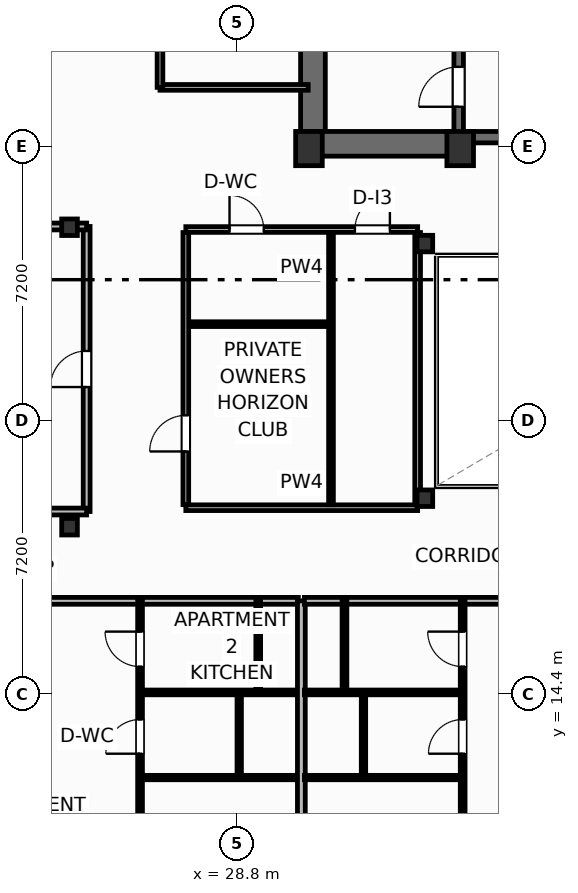
"""IFC4 building model, lengths in metres.
Left out: names, types, materials, properties, quantities, classifications, styles, units other than length and angle.
Written with IfcOpenShell. Run it as: python <this file> out.ifc"""

import sys

from ifc_helpers import new_model, si_unit, direction, frame, frame_2d, origin, origin_2d, place, context, subcontext, project, spatial, rectangle, i_section, extrude, element, fill, save


model = new_model("IFC4")
c1 = context("Model", 3, precision=1e-05, world=origin(), true_north=direction((0.0, 1.0)))
c2 = subcontext(c1, "Body", "Model", "MODEL_VIEW")
j1 = project(units=[si_unit("LENGTHUNIT", "METRE"), si_unit("PLANEANGLEUNIT", "RADIAN")], contexts=[c1])
p1 = place(None, origin())
s1 = spatial("IfcSite", under=j1, at=p1, CompositionType="ELEMENT")
p2 = place(p1, origin())
s2 = spatial("IfcBuilding", under=s1, at=p2, CompositionType="ELEMENT")
p3 = place(p2, frame((0.0, 0.0, 216.4)))
s3 = spatial("IfcBuildingStorey", under=s2, at=p3, CompositionType="ELEMENT", Elevation=216.4)
for number, where, z_axis, x_axis in (
    (1, (30.7, 28.75, 0.0), (0.0, 0.0, 1.0), (1.0, 0.0, 0.0)),
    (2, (34.68, 28.75, 0.0), (0.0, 0.0, 1.0), (1.0, 0.0, 0.0)),
):
    element("IfcColumn", number, at=place(p3, frame(where, z_axis=z_axis, x_axis=x_axis)), inside=s3, PredefinedType="COLUMN", context=c2, shape_type="SweptSolid", body=[
        extrude(rectangle(XDim=0.7, YDim=0.9, at=origin_2d()), origin(), (0.0, 0.0, 1.0), 3.7),
    ])
for number, where, z_axis, x_axis in (
    (3, (33.75, 19.55, 0.0), (0.0, 0.0, 1.0), (1.0, 0.0, 0.0)),
    (4, (33.75, 26.25, 0.0), (0.0, 0.0, 1.0), (1.0, 0.0, 0.0)),
    (5, (24.4, 18.8, 0.0), (0.0, 0.0, 1.0), (1.0, 0.0, 0.0)),
    (6, (24.4, 26.68, 0.0), (0.0, 0.0, 1.0), (1.0, 0.0, 0.0)),
):
    element("IfcColumn", number, at=place(p3, frame(where, z_axis=z_axis, x_axis=x_axis)), inside=s3, PredefinedType="COLUMN", context=c2, shape_type="SweptSolid", body=[
        extrude(i_section(OverallWidth=0.412, OverallDepth=0.435, WebThickness=0.036, FlangeThickness=0.057, FilletRadius=0.025, at=origin_2d()), origin(), (0.0, 0.0, 1.0), 3.7),
    ])
p4 = place(p3, frame((30.805, 29.2, 0.0), z_axis=(0.0, 0.0, 1.0), x_axis=(0.0, 1.0, 0.0)))
e7 = element("IfcWall", 7, at=p4, inside=s3, PredefinedType="SHEAR", context=c2, shape_type="SweptSolid", body=[
    extrude(rectangle(XDim=9.22, YDim=0.65, at=frame_2d((4.61, 0.0))), origin(), (0.0, 0.0, 1.0), 3.45),
])
p5 = place(p3, frame((30.48, 28.875, 0.0), z_axis=(0.0, 0.0, 1.0), x_axis=(1.0, 0.0, 0.0)))
e8 = element("IfcWall", 8, at=p5, inside=s3, PredefinedType="SHEAR", context=c2, shape_type="SweptSolid", body=[
    extrude(rectangle(XDim=4.32, YDim=0.65, at=frame_2d((2.16, 0.0))), origin(), (0.0, 0.0, 1.0), 3.45),
])
p6 = place(p3, frame((34.8, 29.05, 0.0), z_axis=(0.0, 0.0, 1.0), x_axis=(1.0, 0.0, 0.0)))
e9 = element("IfcWall", 9, at=p6, inside=s3, PredefinedType="SHEAR", context=c2, shape_type="SweptSolid", body=[
    extrude(rectangle(XDim=8.8, YDim=0.3, at=frame_2d((4.4, 0.0))), origin(), (0.0, 0.0, 1.0), 3.45),
])
p7 = place(p6, frame((0.95, 0.0, 0.0)))
e10 = element("IfcOpeningElement", 10, at=p7, cuts=e9, PredefinedType="OPENING", context=c2, shape_type="SweptSolid", body=[
    extrude(rectangle(XDim=1.1, YDim=2.15, at=frame_2d((0.55, 1.075))), frame((0.0, 0.16, 0.0), z_axis=(0.0, -1.0, 0.0), x_axis=(1.0, 0.0, 0.0)), (0.0, 0.0, 1.0), 0.32),
])
p8 = place(p6, frame((6.75, 0.0, 0.0)))
e11 = element("IfcOpeningElement", 11, at=p8, cuts=e9, PredefinedType="OPENING", context=c2, shape_type="SweptSolid", body=[
    extrude(rectangle(XDim=1.1, YDim=2.15, at=frame_2d((0.55, 1.075))), frame((0.0, 0.16, 0.0), z_axis=(0.0, -1.0, 0.0), x_axis=(1.0, 0.0, 0.0)), (0.0, 0.0, 1.0), 0.32),
])
p9 = place(p6, frame((3.32, 0.0, 0.0)))
e12 = element("IfcOpeningElement", 12, at=p9, cuts=e9, PredefinedType="OPENING", context=c2, shape_type="SweptSolid", body=[
    extrude(rectangle(XDim=0.95, YDim=2.15, at=frame_2d((0.475, 1.075))), frame((0.0, 0.16, 0.0), z_axis=(0.0, -1.0, 0.0), x_axis=(1.0, 0.0, 0.0)), (0.0, 0.0, 1.0), 0.32),
])
p10 = place(p3, frame((34.64, 29.2, 0.0), z_axis=(0.0, 0.0, 1.0), x_axis=(0.0, 1.0, 0.0)))
e13 = element("IfcWall", 13, at=p10, inside=s3, PredefinedType="SHEAR", context=c2, shape_type="SweptSolid", body=[
    extrude(rectangle(XDim=9.22, YDim=0.25, at=frame_2d((4.61, 0.0))), origin(), (0.0, 0.0, 1.0), 3.45),
])
p11 = place(p10, frame((0.65, 0.0, 0.0)))
e14 = element("IfcOpeningElement", 14, at=p11, cuts=e13, PredefinedType="OPENING", context=c2, shape_type="SweptSolid", body=[
    extrude(rectangle(XDim=1.05, YDim=2.15, at=frame_2d((0.525, 1.075))), frame((0.0, 0.135, 0.0), z_axis=(0.0, -1.0, 0.0), x_axis=(1.0, 0.0, 0.0)), (0.0, 0.0, 1.0), 0.27),
])
p12 = place(p3, frame((20.58, 16.85, 0.0), z_axis=(0.0, 0.0, 1.0), x_axis=(1.0, 0.0, 0.0)))
e15 = element("IfcWall", 15, at=p12, inside=s3, PredefinedType="PARTITIONING", context=c2, shape_type="SweptSolid", body=[
    extrude(rectangle(XDim=9.84, YDim=0.18, at=frame_2d((4.92, 0.0))), origin(), (0.0, 0.0, 1.0), 3.45),
])
p13 = place(p12, frame((2.302, 0.0, 0.0)))
e16 = element("IfcOpeningElement", 16, at=p13, cuts=e15, PredefinedType="OPENING", context=c2, shape_type="SweptSolid", body=[
    extrude(rectangle(XDim=1.0, YDim=2.2, at=frame_2d((0.5, 1.1))), frame((0.0, 0.1, 0.0), z_axis=(0.0, -1.0, 0.0), x_axis=(1.0, 0.0, 0.0)), (0.0, 0.0, 1.0), 0.2),
])
p14 = place(p3, frame((26.255, -1.478, 0.0), z_axis=(0.0, 0.0, 1.0), x_axis=(0.0, 1.0, 0.0)))
e17 = element("IfcWall", 17, at=p14, inside=s3, PredefinedType="PARTITIONING", context=c2, shape_type="SweptSolid", body=[
    extrude(rectangle(XDim=18.328, YDim=0.125, at=frame_2d((9.164, 0.0))), origin(), (0.0, 0.0, 1.0), 2.739),
])
p15 = place(p14, frame((6.319, 0.0, 0.0)))
e18 = element("IfcOpeningElement", 18, at=p15, cuts=e17, PredefinedType="OPENING", context=c2, shape_type="SweptSolid", body=[
    extrude(rectangle(XDim=0.92, YDim=2.05, at=frame_2d((0.46, 1.025))), frame((0.0, 0.073, 0.0), z_axis=(0.0, -1.0, 0.0), x_axis=(1.0, 0.0, 0.0)), (0.0, 0.0, 1.0), 0.145),
])
p16 = place(p14, frame((14.305, 0.0, 0.0)))
e19 = element("IfcOpeningElement", 19, at=p16, cuts=e17, PredefinedType="OPENING", context=c2, shape_type="SweptSolid", body=[
    extrude(rectangle(XDim=0.9, YDim=2.05, at=frame_2d((0.45, 1.025))), frame((0.0, 0.073, 0.0), z_axis=(0.0, -1.0, 0.0), x_axis=(1.0, 0.0, 0.0)), (0.0, 0.0, 1.0), 0.145),
])
p17 = place(p14, frame((16.598, 0.0, 0.0)))
e20 = element("IfcOpeningElement", 20, at=p17, cuts=e17, PredefinedType="OPENING", context=c2, shape_type="SweptSolid", body=[
    extrude(rectangle(XDim=0.92, YDim=2.05, at=frame_2d((0.46, 1.025))), frame((0.0, 0.073, 0.0), z_axis=(0.0, -1.0, 0.0), x_axis=(1.0, 0.0, 0.0)), (0.0, 0.0, 1.0), 0.145),
])
p18 = place(p3, frame((26.325, 14.44, 0.0), z_axis=(0.0, 0.0, 1.0), x_axis=(1.0, 0.0, 0.0)))
e21 = element("IfcWall", 21, at=p18, inside=s3, PredefinedType="PARTITIONING", context=c2, shape_type="SweptSolid", body=[
    extrude(rectangle(XDim=4.095, YDim=0.125, at=frame_2d((2.047, 0.0))), origin(), (0.0, 0.0, 1.0), 3.45),
])
p19 = place(p3, frame((26.325, 12.2, 0.0), z_axis=(0.0, 0.0, 1.0), x_axis=(1.0, 0.0, 0.0)))
e22 = element("IfcWall", 22, at=p19, inside=s3, PredefinedType="PARTITIONING", context=c2, shape_type="SweptSolid", body=[
    extrude(rectangle(XDim=4.095, YDim=0.115, at=frame_2d((2.047, 0.0))), origin(), (0.0, 0.0, 1.0), 3.45),
])
p20 = place(p3, frame((29.365, 14.44, 0.0), z_axis=(0.0, 0.0, 1.0), x_axis=(0.0, 1.0, 0.0)))
e23 = element("IfcWall", 23, at=p20, inside=s3, PredefinedType="PARTITIONING", context=c2, shape_type="SweptSolid", body=[
    extrude(rectangle(XDim=2.41, YDim=0.125, at=frame_2d((1.205, 0.0))), origin(), (0.0, 0.0, 1.0), 3.45),
])
p21 = place(p3, frame((28.865, 12.2, 0.0), z_axis=(0.0, 0.0, 1.0), x_axis=(0.0, 1.0, 0.0)))
e24 = element("IfcWall", 24, at=p21, inside=s3, PredefinedType="PARTITIONING", context=c2, shape_type="SweptSolid", body=[
    extrude(rectangle(XDim=2.24, YDim=0.115, at=frame_2d((1.12, 0.0))), origin(), (0.0, 0.0, 1.0), 3.45),
])
p22 = place(p3, frame((30.5, 0.129, 0.0), z_axis=(0.0, 0.0, 1.0), x_axis=(0.0, 1.0, 0.0)))
e25 = element("IfcWall", 25, at=p22, inside=s3, PredefinedType="PARTITIONING", context=c2, shape_type="SweptSolid", body=[
    extrude(rectangle(XDim=16.721, YDim=0.205, at=frame_2d((8.36, 0.0))), origin(), (0.0, 0.0, 1.0), 3.45),
])
p23 = place(p3, frame((30.58, 16.85, 0.0), z_axis=(0.0, 0.0, 1.0), x_axis=(1.0, 0.0, 0.0)))
e26 = element("IfcWall", 26, at=p23, inside=s3, PredefinedType="PARTITIONING", context=c2, shape_type="SweptSolid", body=[
    extrude(rectangle(XDim=9.84, YDim=0.18, at=frame_2d((4.92, 0.0))), origin(), (0.0, 0.0, 1.0), 3.45),
])
p24 = place(p23, frame((6.537, 0.0, 0.0)))
e27 = element("IfcOpeningElement", 27, at=p24, cuts=e26, PredefinedType="OPENING", context=c2, shape_type="SweptSolid", body=[
    extrude(rectangle(XDim=1.0, YDim=2.2, at=frame_2d((0.5, 1.1))), frame((0.0, 0.1, 0.0), z_axis=(0.0, -1.0, 0.0), x_axis=(1.0, 0.0, 0.0)), (0.0, 0.0, 1.0), 0.2),
])
p25 = place(p3, frame((34.745, 1.736, 0.0), z_axis=(0.0, 0.0, 1.0), x_axis=(0.0, 1.0, 0.0)))
e28 = element("IfcWall", 28, at=p25, inside=s3, PredefinedType="PARTITIONING", context=c2, shape_type="SweptSolid", body=[
    extrude(rectangle(XDim=15.114, YDim=0.125, at=frame_2d((7.557, 0.0))), origin(), (0.0, 0.0, 1.0), 2.739),
])
p26 = place(p25, frame((4.712, 0.0, 0.0)))
e29 = element("IfcOpeningElement", 29, at=p26, cuts=e28, PredefinedType="OPENING", context=c2, shape_type="SweptSolid", body=[
    extrude(rectangle(XDim=0.92, YDim=2.05, at=frame_2d((0.46, 1.025))), frame((0.0, 0.073, 0.0), z_axis=(0.0, -1.0, 0.0), x_axis=(1.0, 0.0, 0.0)), (0.0, 0.0, 1.0), 0.145),
])
p27 = place(p25, frame((11.091, 0.0, 0.0)))
e30 = element("IfcOpeningElement", 30, at=p27, cuts=e28, PredefinedType="OPENING", context=c2, shape_type="SweptSolid", body=[
    extrude(rectangle(XDim=0.9, YDim=2.05, at=frame_2d((0.45, 1.025))), frame((0.0, 0.073, 0.0), z_axis=(0.0, -1.0, 0.0), x_axis=(1.0, 0.0, 0.0)), (0.0, 0.0, 1.0), 0.145),
])
p28 = place(p25, frame((13.384, 0.0, 0.0)))
e31 = element("IfcOpeningElement", 31, at=p28, cuts=e28, PredefinedType="OPENING", context=c2, shape_type="SweptSolid", body=[
    extrude(rectangle(XDim=0.92, YDim=2.05, at=frame_2d((0.46, 1.025))), frame((0.0, 0.073, 0.0), z_axis=(0.0, -1.0, 0.0), x_axis=(1.0, 0.0, 0.0)), (0.0, 0.0, 1.0), 0.145),
])
p29 = place(p3, frame((30.58, 14.44, 0.0), z_axis=(0.0, 0.0, 1.0), x_axis=(1.0, 0.0, 0.0)))
e32 = element("IfcWall", 32, at=p29, inside=s3, PredefinedType="PARTITIONING", context=c2, shape_type="SweptSolid", body=[
    extrude(rectangle(XDim=4.095, YDim=0.125, at=frame_2d((2.047, 0.0))), origin(), (0.0, 0.0, 1.0), 3.45),
])
p30 = place(p3, frame((30.58, 12.2, 0.0), z_axis=(0.0, 0.0, 1.0), x_axis=(1.0, 0.0, 0.0)))
e33 = element("IfcWall", 33, at=p30, inside=s3, PredefinedType="PARTITIONING", context=c2, shape_type="SweptSolid", body=[
    extrude(rectangle(XDim=4.095, YDim=0.115, at=frame_2d((2.047, 0.0))), origin(), (0.0, 0.0, 1.0), 3.45),
])
p31 = place(p3, frame((31.635, 14.44, 0.0), z_axis=(0.0, 0.0, 1.0), x_axis=(0.0, 1.0, 0.0)))
e34 = element("IfcWall", 34, at=p31, inside=s3, PredefinedType="PARTITIONING", context=c2, shape_type="SweptSolid", body=[
    extrude(rectangle(XDim=2.41, YDim=0.125, at=frame_2d((1.205, 0.0))), origin(), (0.0, 0.0, 1.0), 3.45),
])
p32 = place(p3, frame((32.135, 12.2, 0.0), z_axis=(0.0, 0.0, 1.0), x_axis=(0.0, 1.0, 0.0)))
e35 = element("IfcWall", 35, at=p32, inside=s3, PredefinedType="PARTITIONING", context=c2, shape_type="SweptSolid", body=[
    extrude(rectangle(XDim=2.24, YDim=0.115, at=frame_2d((1.12, 0.0))), origin(), (0.0, 0.0, 1.0), 3.45),
])
p33 = place(p3, frame((24.85, 19.2, 0.0), z_axis=(0.0, 0.0, 1.0), x_axis=(0.0, 1.0, 0.0)))
e36 = element("IfcWall", 36, at=p33, inside=s3, PredefinedType="PARTITIONING", context=c2, shape_type="SweptSolid", body=[
    extrude(rectangle(XDim=7.5, YDim=0.18, at=frame_2d((3.75, 0.0))), origin(), (0.0, 0.0, 1.0), 3.45),
])
p34 = place(p33, frame((3.275, 0.0, 0.0)))
e37 = element("IfcOpeningElement", 37, at=p34, cuts=e36, PredefinedType="OPENING", context=c2, shape_type="SweptSolid", body=[
    extrude(rectangle(XDim=0.95, YDim=2.05, at=frame_2d((0.475, 1.025))), frame((0.0, 0.1, 0.0), z_axis=(0.0, -1.0, 0.0), x_axis=(1.0, 0.0, 0.0)), (0.0, 0.0, 1.0), 0.2),
])
p35 = place(p3, frame((6.306, 19.2, 0.0), z_axis=(0.0, 0.0, 1.0), x_axis=(1.0, 0.0, 0.0)))
e38 = element("IfcWall", 38, at=p35, inside=s3, PredefinedType="PARTITIONING", context=c2, shape_type="SweptSolid", body=[
    extrude(rectangle(XDim=18.544, YDim=0.18, at=frame_2d((9.272, 0.0))), origin(), (0.0, 0.0, 1.0), 3.45),
])
p36 = place(p3, frame((3.467, 26.7, 0.0), z_axis=(0.0, 0.0, 1.0), x_axis=(1.0, 0.0, 0.0)))
e39 = element("IfcWall", 39, at=p36, inside=s3, PredefinedType="PARTITIONING", context=c2, shape_type="SweptSolid", body=[
    extrude(rectangle(XDim=21.383, YDim=0.18, at=frame_2d((10.691, 0.0))), origin(), (0.0, 0.0, 1.0), 2.662),
])
p37 = place(p3, frame((27.46, 19.3, 0.0), z_axis=(0.0, 0.0, 1.0), x_axis=(1.0, 0.0, 0.0)))
e40 = element("IfcWall", 40, at=p37, inside=s3, PredefinedType="PARTITIONING", context=c2, shape_type="SweptSolid", body=[
    extrude(rectangle(XDim=6.1, YDim=0.15, at=frame_2d((3.05, 0.0))), origin(), (0.0, 0.0, 1.0), 2.662),
])
p38 = place(p3, frame((27.46, 26.62, 0.0), z_axis=(0.0, 0.0, 1.0), x_axis=(1.0, 0.0, 0.0)))
e41 = element("IfcWall", 41, at=p38, inside=s3, PredefinedType="PARTITIONING", context=c2, shape_type="SweptSolid", body=[
    extrude(rectangle(XDim=6.1, YDim=0.15, at=frame_2d((3.05, 0.0))), origin(), (0.0, 0.0, 1.0), 2.662),
])
p39 = place(p38, frame((1.15, 0.0, 0.0)))
e42 = element("IfcOpeningElement", 42, at=p39, cuts=e41, PredefinedType="OPENING", context=c2, shape_type="SweptSolid", body=[
    extrude(rectangle(XDim=0.9, YDim=2.05, at=frame_2d((0.45, 1.025))), frame((0.0, 0.085, 0.0), z_axis=(0.0, -1.0, 0.0), x_axis=(1.0, 0.0, 0.0)), (0.0, 0.0, 1.0), 0.17),
])
p40 = place(p38, frame((4.45, 0.0, 0.0)))
e43 = element("IfcOpeningElement", 43, at=p40, cuts=e41, PredefinedType="OPENING", context=c2, shape_type="SweptSolid", body=[
    extrude(rectangle(XDim=0.92, YDim=2.05, at=frame_2d((0.46, 1.025))), frame((0.0, 0.085, 0.0), z_axis=(0.0, -1.0, 0.0), x_axis=(1.0, 0.0, 0.0)), (0.0, 0.0, 1.0), 0.17),
])
p41 = place(p3, frame((31.28, 19.38, 0.0), z_axis=(0.0, 0.0, 1.0), x_axis=(0.0, 1.0, 0.0)))
e44 = element("IfcWall", 44, at=p41, inside=s3, PredefinedType="PARTITIONING", context=c2, shape_type="SweptSolid", body=[
    extrude(rectangle(XDim=7.16, YDim=0.125, at=frame_2d((3.58, 0.0))), origin(), (0.0, 0.0, 1.0), 3.45),
])
p42 = place(p3, frame((27.52, 24.13, 0.0), z_axis=(0.0, 0.0, 1.0), x_axis=(1.0, 0.0, 0.0)))
e45 = element("IfcWall", 45, at=p42, inside=s3, PredefinedType="PARTITIONING", context=c2, shape_type="SweptSolid", body=[
    extrude(rectangle(XDim=3.7, YDim=0.125, at=frame_2d((1.85, 0.0))), origin(), (0.0, 0.0, 1.0), 3.45),
])
p43 = place(p3, frame((27.46, 19.38, 0.0), z_axis=(0.0, 0.0, 1.0), x_axis=(0.0, 1.0, 0.0)))
e46 = element("IfcWall", 46, at=p43, inside=s3, PredefinedType="PARTITIONING", context=c2, shape_type="SweptSolid", body=[
    extrude(rectangle(XDim=7.16, YDim=0.15, at=frame_2d((3.58, 0.0))), origin(), (0.0, 0.0, 1.0), 3.45),
])
p44 = place(p43, frame((1.4, 0.0, 0.0)))
e47 = element("IfcOpeningElement", 47, at=p44, cuts=e46, PredefinedType="OPENING", context=c2, shape_type="SweptSolid", body=[
    extrude(rectangle(XDim=0.95, YDim=2.05, at=frame_2d((0.475, 1.025))), frame((0.0, 0.085, 0.0), z_axis=(0.0, -1.0, 0.0), x_axis=(1.0, 0.0, 0.0)), (0.0, 0.0, 1.0), 0.17),
])
p45 = place(p3, frame((33.56, 19.38, 0.0), z_axis=(0.0, 0.0, 1.0), x_axis=(0.0, 1.0, 0.0)))
e48 = element("IfcWall", 48, at=p45, inside=s3, PredefinedType="PARTITIONING", context=c2, shape_type="SweptSolid", body=[
    extrude(rectangle(XDim=7.16, YDim=0.15, at=frame_2d((3.58, 0.0))), origin(), (0.0, 0.0, 1.0), 2.824),
])
p46 = place(p3, frame((26.78, 30.36, 0.0), z_axis=(0.0, 0.0, 1.0), x_axis=(1.0, 0.0, 0.0)))
e49 = element("IfcWall", 49, at=p46, inside=s3, PredefinedType="PARTITIONING", context=c2, shape_type="SweptSolid", body=[
    extrude(rectangle(XDim=3.9, YDim=0.15, at=frame_2d((1.95, 0.0))), origin(), (0.0, 0.0, 1.0), 3.45),
])
p47 = place(p3, frame((26.78, 30.36, 0.0), z_axis=(0.0, 0.0, 1.0), x_axis=(0.0, 1.0, 0.0)))
e50 = element("IfcWall", 50, at=p47, inside=s3, PredefinedType="PARTITIONING", context=c2, shape_type="SweptSolid", body=[
    extrude(rectangle(XDim=7.9, YDim=0.15, at=frame_2d((3.95, 0.0))), origin(), (0.0, 0.0, 1.0), 3.45),
])
p48 = place(p47, frame((2.2, 0.0, 0.0)))
e51 = element("IfcOpeningElement", 51, at=p48, cuts=e50, PredefinedType="OPENING", context=c2, shape_type="SweptSolid", body=[
    extrude(rectangle(XDim=0.95, YDim=2.05, at=frame_2d((0.475, 1.025))), frame((0.0, 0.085, 0.0), z_axis=(0.0, -1.0, 0.0), x_axis=(1.0, 0.0, 0.0)), (0.0, 0.0, 1.0), 0.17),
])
p49 = place(p16, origin())
e52 = element("IfcDoor", 52, at=p49, inside=s3, OperationType="SINGLE_SWING_LEFT", PredefinedType="DOOR", context=c2, shape_type="SweptSolid", body=[
    extrude(rectangle(XDim=0.9, YDim=2.05, at=frame_2d((0.45, 1.025))), frame((0.0, 0.025, 0.0), z_axis=(0.0, -1.0, 0.0), x_axis=(1.0, 0.0, 0.0)), (0.0, 0.0, 1.0), 0.05),
])
fill(e19, e52)
p50 = place(p17, origin())
e53 = element("IfcDoor", 53, at=p50, inside=s3, OperationType="SINGLE_SWING_RIGHT", PredefinedType="DOOR", context=c2, shape_type="SweptSolid", body=[
    extrude(rectangle(XDim=0.92, YDim=2.05, at=frame_2d((0.46, 1.025))), frame((0.0, 0.025, 0.0), z_axis=(0.0, -1.0, 0.0), x_axis=(1.0, 0.0, 0.0)), (0.0, 0.0, 1.0), 0.05),
])
fill(e20, e53)
p51 = place(p27, origin())
e54 = element("IfcDoor", 54, at=p51, inside=s3, OperationType="SINGLE_SWING_LEFT", PredefinedType="DOOR", context=c2, shape_type="SweptSolid", body=[
    extrude(rectangle(XDim=0.9, YDim=2.05, at=frame_2d((0.45, 1.025))), frame((0.0, 0.025, 0.0), z_axis=(0.0, -1.0, 0.0), x_axis=(1.0, 0.0, 0.0)), (0.0, 0.0, 1.0), 0.05),
])
fill(e30, e54)
p52 = place(p28, origin())
e55 = element("IfcDoor", 55, at=p52, inside=s3, OperationType="SINGLE_SWING_RIGHT", PredefinedType="DOOR", context=c2, shape_type="SweptSolid", body=[
    extrude(rectangle(XDim=0.92, YDim=2.05, at=frame_2d((0.46, 1.025))), frame((0.0, 0.025, 0.0), z_axis=(0.0, -1.0, 0.0), x_axis=(1.0, 0.0, 0.0)), (0.0, 0.0, 1.0), 0.05),
])
fill(e31, e55)
p53 = place(p34, origin())
e56 = element("IfcDoor", 56, at=p53, inside=s3, OperationType="SINGLE_SWING_LEFT", PredefinedType="DOOR", context=c2, shape_type="SweptSolid", body=[
    extrude(rectangle(XDim=0.95, YDim=2.05, at=frame_2d((0.475, 1.025))), frame((0.0, 0.025, 0.0), z_axis=(0.0, -1.0, 0.0), x_axis=(1.0, 0.0, 0.0)), (0.0, 0.0, 1.0), 0.05),
])
fill(e37, e56)
p54 = place(p11, origin())
e57 = element("IfcDoor", 57, at=p54, inside=s3, OperationType="SINGLE_SWING_LEFT", PredefinedType="DOOR", context=c2, shape_type="SweptSolid", body=[
    extrude(rectangle(XDim=1.05, YDim=2.15, at=frame_2d((0.525, 1.075))), frame((0.0, 0.025, 0.0), z_axis=(0.0, -1.0, 0.0), x_axis=(1.0, 0.0, 0.0)), (0.0, 0.0, 1.0), 0.05),
])
fill(e14, e57)
p55 = place(p39, origin())
e58 = element("IfcDoor", 58, at=p55, inside=s3, OperationType="SINGLE_SWING_LEFT", PredefinedType="DOOR", context=c2, shape_type="SweptSolid", body=[
    extrude(rectangle(XDim=0.9, YDim=2.05, at=frame_2d((0.45, 1.025))), frame((0.0, 0.025, 0.0), z_axis=(0.0, -1.0, 0.0), x_axis=(1.0, 0.0, 0.0)), (0.0, 0.0, 1.0), 0.05),
])
fill(e42, e58)
p56 = place(p40, origin())
e59 = element("IfcDoor", 59, at=p56, inside=s3, OperationType="SINGLE_SWING_RIGHT", PredefinedType="DOOR", context=c2, shape_type="SweptSolid", body=[
    extrude(rectangle(XDim=0.92, YDim=2.05, at=frame_2d((0.46, 1.025))), frame((0.0, 0.025, 0.0), z_axis=(0.0, -1.0, 0.0), x_axis=(1.0, 0.0, 0.0)), (0.0, 0.0, 1.0), 0.05),
])
fill(e43, e59)
p57 = place(p44, origin())
e60 = element("IfcDoor", 60, at=p57, inside=s3, OperationType="SINGLE_SWING_LEFT", PredefinedType="DOOR", context=c2, shape_type="SweptSolid", body=[
    extrude(rectangle(XDim=0.95, YDim=2.05, at=frame_2d((0.475, 1.025))), frame((0.0, 0.025, 0.0), z_axis=(0.0, -1.0, 0.0), x_axis=(1.0, 0.0, 0.0)), (0.0, 0.0, 1.0), 0.05),
])
fill(e47, e60)
save(model, sys.argv[1])
